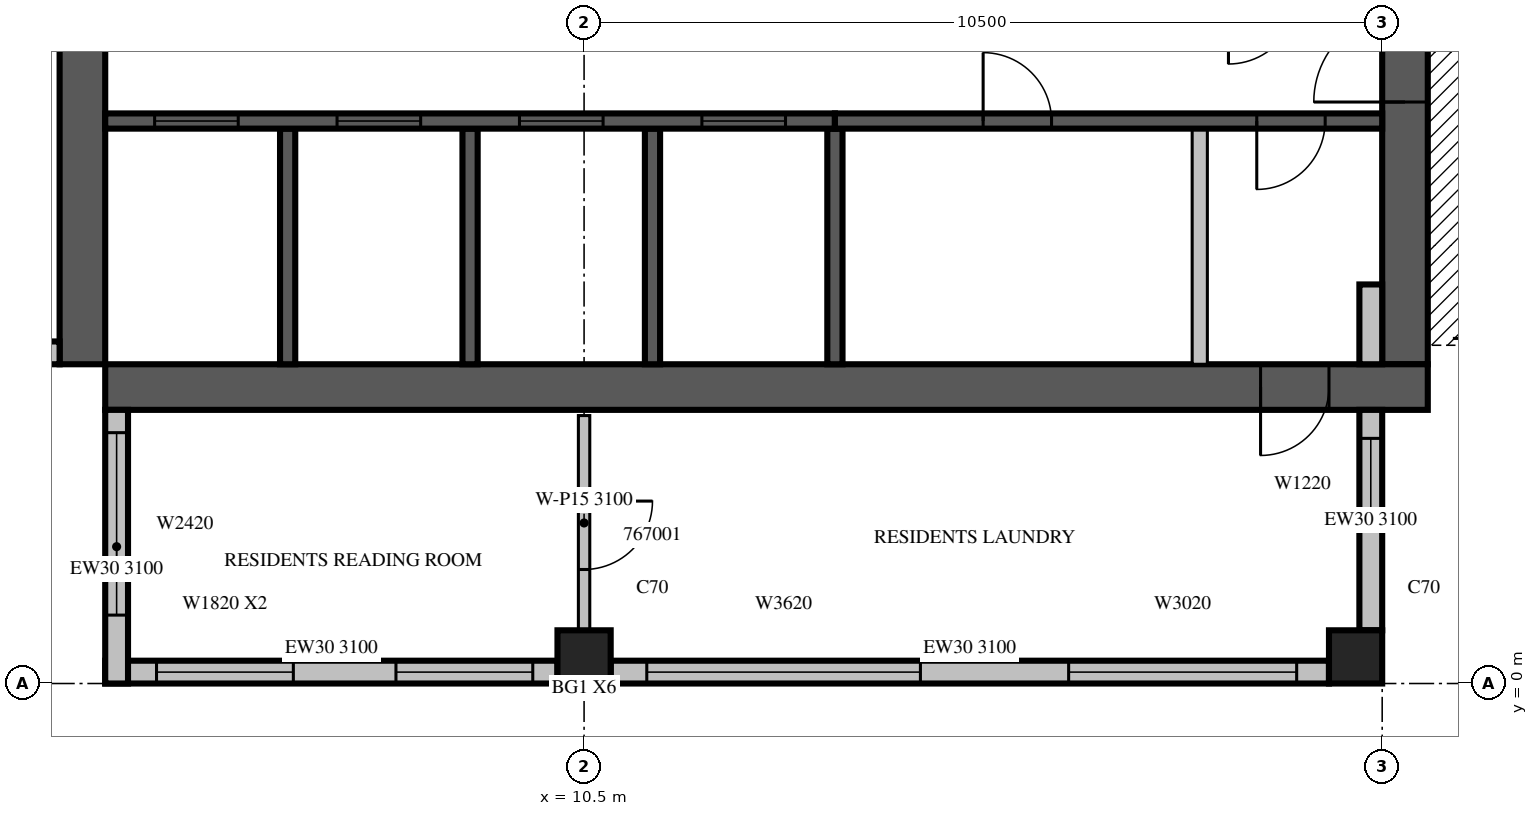
"""IFC4 building model, lengths in metres.
Left out: names, types, materials, properties, quantities, classifications, styles, units other than length and angle.
Written with IfcOpenShell. Run it as: python <this file> out.ifc"""

import sys

from ifc_helpers import new_model, si_unit, direction, frame, frame_2d, origin, origin_2d, place, context, subcontext, project, spatial, rectangle, extrude, source, transform, mapped, element, fill, save


model = new_model("IFC4")
c1 = context("Model", 3, precision=1e-05, world=origin(), true_north=direction((0.0, 1.0)))
c2 = subcontext(c1, "Body", "Model", "MODEL_VIEW")
j1 = project(units=[si_unit("LENGTHUNIT", "METRE"), si_unit("PLANEANGLEUNIT", "RADIAN")], contexts=[c1])
p1 = place(None, origin())
s1 = spatial("IfcSite", under=j1, at=p1, CompositionType="ELEMENT")
p2 = place(p1, origin())
s2 = spatial("IfcBuilding", under=s1, at=p2, CompositionType="ELEMENT")
p3 = place(p2, frame((0.0, 0.0, 295.0)))
s3 = spatial("IfcBuildingStorey", under=s2, at=p3, CompositionType="ELEMENT", Elevation=295.0)
m1 = source(origin(), c2, "Body", "SweptSolid", [
    extrude(rectangle(XDim=0.7, YDim=0.7, at=origin_2d()), origin(), (0.0, 0.0, 1.0), 3.5),
])
for number, where, z_axis, x_axis in (
    (1, (10.5, 0.35, 0.0), (0.0, 0.0, 1.0), (1.0, 0.0, 0.0)),
    (2, (20.65, 0.35, 0.0), (0.0, 0.0, 1.0), (1.0, 0.0, 0.0)),
):
    element("IfcColumn", number, at=place(p3, frame(where, z_axis=z_axis, x_axis=x_axis)), inside=s3, PredefinedType="COLUMN", context=c2, shape_type="MappedRepresentation", body=[
        mapped(m1, transform((0.0, 0.0, 0.0), scale=1.0)),
    ])
m2 = source(origin(), c2, "Body", "SweptSolid", [
    extrude(rectangle(XDim=17.4, YDim=0.6, at=frame_2d((8.7, 0.0))), origin(), (0.0, 0.0, 1.0), 3.5),
])
p4 = place(p3, frame((3.9, 4.2, 0.0), z_axis=(0.0, 0.0, 1.0), x_axis=(0.0, 1.0, 0.0)))
e3 = element("IfcWall", 3, at=p4, inside=s3, PredefinedType="SHEAR", context=c2, shape_type="MappedRepresentation", body=[
    mapped(m2, transform((0.0, 0.0, 0.0), scale=1.0)),
])
m3 = source(origin(), c2, "Body", "SweptSolid", [
    extrude(rectangle(XDim=2.2, YDim=2.1, at=frame_2d((1.1, 1.05))), frame((0.0, 0.31, 0.0), z_axis=(0.0, -1.0, 0.0), x_axis=(1.0, 0.0, 0.0)), (0.0, 0.0, 1.0), 0.62),
])
p5 = place(p4, frame((4.2, 0.0, 0.0)))
e4 = element("IfcOpeningElement", 4, at=p5, cuts=e3, PredefinedType="OPENING", context=c2, shape_type="MappedRepresentation", body=[
    mapped(m3, transform((0.0, 0.0, 0.0), scale=1.0)),
])
m4 = source(origin(), c2, "Body", "SweptSolid", [
    extrude(rectangle(XDim=0.9, YDim=2.1, at=frame_2d((0.45, 1.05))), frame((0.0, 0.31, 0.0), z_axis=(0.0, -1.0, 0.0), x_axis=(1.0, 0.0, 0.0)), (0.0, 0.0, 1.0), 0.62),
])
p6 = place(p4, frame((10.95, 0.0, 0.0)))
e5 = element("IfcOpeningElement", 5, at=p6, cuts=e3, PredefinedType="OPENING", context=c2, shape_type="MappedRepresentation", body=[
    mapped(m4, transform((0.0, 0.0, 0.0), scale=1.0)),
])
m5 = source(origin(), c2, "Body", "SweptSolid", [
    extrude(rectangle(XDim=6.3, YDim=0.6, at=frame_2d((3.15, 0.0))), origin(), (0.0, 0.0, 1.0), 3.5),
])
p7 = place(p3, frame((21.3, 4.2, 0.0), z_axis=(0.0, 0.0, 1.0), x_axis=(0.0, 1.0, 0.0)))
e6 = element("IfcWall", 6, at=p7, inside=s3, PredefinedType="SHEAR", context=c2, shape_type="MappedRepresentation", body=[
    mapped(m5, transform((0.0, 0.0, 0.0), scale=1.0)),
])
m6 = source(origin(), c2, "Body", "SweptSolid", [
    extrude(rectangle(XDim=1.2, YDim=2.1, at=frame_2d((0.6, 1.05))), frame((0.0, 0.31, 0.0), z_axis=(0.0, -1.0, 0.0), x_axis=(1.0, 0.0, 0.0)), (0.0, 0.0, 1.0), 0.62),
])
p8 = place(p7, frame((3.45, 0.0, 0.0)))
e7 = element("IfcOpeningElement", 7, at=p8, cuts=e6, PredefinedType="OPENING", context=c2, shape_type="MappedRepresentation", body=[
    mapped(m6, transform((0.0, 0.0, 0.0), scale=1.0)),
])
p9 = place(p3, frame((4.2, 3.9, 0.0), z_axis=(0.0, 0.0, 1.0), x_axis=(1.0, 0.0, 0.0)))
e8 = element("IfcWall", 8, at=p9, inside=s3, PredefinedType="SHEAR", context=c2, shape_type="MappedRepresentation", body=[
    mapped(m2, transform((0.0, 0.0, 0.0), scale=1.0)),
])
p10 = place(p9, frame((15.2, 0.0, 0.0)))
e9 = element("IfcOpeningElement", 9, at=p10, cuts=e8, PredefinedType="OPENING", context=c2, shape_type="MappedRepresentation", body=[
    mapped(m4, transform((0.0, 0.0, 0.0), scale=1.0)),
])
m7 = source(origin(), c2, "Body", "SweptSolid", [
    extrude(rectangle(XDim=5.95, YDim=0.3, at=frame_2d((2.975, 0.0))), origin(), (0.0, 0.0, 1.0), 3.1),
])
p11 = place(p3, frame((4.2, 0.15, 0.0), z_axis=(0.0, 0.0, 1.0), x_axis=(1.0, 0.0, 0.0)))
e10 = element("IfcWall", 10, at=p11, inside=s3, PredefinedType="STANDARD", context=c2, shape_type="MappedRepresentation", body=[
    mapped(m7, transform((0.0, 0.0, 0.0), scale=1.0)),
])
m8 = source(origin(), c2, "Body", "SweptSolid", [
    extrude(rectangle(XDim=1.8, YDim=2.0, at=frame_2d((0.9, 1.0))), frame((0.0, 0.16, 0.0), z_axis=(0.0, -1.0, 0.0), x_axis=(1.0, 0.0, 0.0)), (0.0, 0.0, 1.0), 0.32),
])
p12 = place(p11, frame((0.675, 0.0, 0.6)))
e11 = element("IfcOpeningElement", 11, at=p12, cuts=e10, PredefinedType="OPENING", context=c2, shape_type="MappedRepresentation", body=[
    mapped(m8, transform((0.0, 0.0, 0.0), scale=1.0)),
])
p13 = place(p11, frame((3.825, 0.0, 0.6)))
e12 = element("IfcOpeningElement", 12, at=p13, cuts=e10, PredefinedType="OPENING", context=c2, shape_type="MappedRepresentation", body=[
    mapped(m8, transform((0.0, 0.0, 0.0), scale=1.0)),
])
m9 = source(origin(), c2, "Body", "SweptSolid", [
    extrude(rectangle(XDim=9.45, YDim=0.3, at=frame_2d((4.725, 0.0))), origin(), (0.0, 0.0, 1.0), 3.1),
])
p14 = place(p3, frame((10.85, 0.15, 0.0), z_axis=(0.0, 0.0, 1.0), x_axis=(1.0, 0.0, 0.0)))
e13 = element("IfcWall", 13, at=p14, inside=s3, PredefinedType="STANDARD", context=c2, shape_type="MappedRepresentation", body=[
    mapped(m9, transform((0.0, 0.0, 0.0), scale=1.0)),
])
m10 = source(origin(), c2, "Body", "SweptSolid", [
    extrude(rectangle(XDim=3.6, YDim=2.0, at=frame_2d((1.8, 1.0))), frame((0.0, 0.16, 0.0), z_axis=(0.0, -1.0, 0.0), x_axis=(1.0, 0.0, 0.0)), (0.0, 0.0, 1.0), 0.32),
])
p15 = place(p14, frame((0.475, 0.0, 0.6)))
e14 = element("IfcOpeningElement", 14, at=p15, cuts=e13, PredefinedType="OPENING", context=c2, shape_type="MappedRepresentation", body=[
    mapped(m10, transform((0.0, 0.0, 0.0), scale=1.0)),
])
m11 = source(origin(), c2, "Body", "SweptSolid", [
    extrude(rectangle(XDim=3.0, YDim=2.0, at=frame_2d((1.5, 1.0))), frame((0.0, 0.16, 0.0), z_axis=(0.0, -1.0, 0.0), x_axis=(1.0, 0.0, 0.0)), (0.0, 0.0, 1.0), 0.32),
])
p16 = place(p14, frame((6.025, 0.0, 0.6)))
e15 = element("IfcOpeningElement", 15, at=p16, cuts=e13, PredefinedType="OPENING", context=c2, shape_type="MappedRepresentation", body=[
    mapped(m11, transform((0.0, 0.0, 0.0), scale=1.0)),
])
m12 = source(origin(), c2, "Body", "SweptSolid", [
    extrude(rectangle(XDim=2.9, YDim=0.3, at=frame_2d((1.45, 0.0))), origin(), (0.0, 0.0, 1.0), 3.1),
])
p17 = place(p3, frame((20.85, 0.7, 0.0), z_axis=(0.0, 0.0, 1.0), x_axis=(0.0, 1.0, 0.0)))
e16 = element("IfcWall", 16, at=p17, inside=s3, PredefinedType="STANDARD", context=c2, shape_type="MappedRepresentation", body=[
    mapped(m12, transform((0.0, 0.0, 0.0), scale=1.0)),
])
m13 = source(origin(), c2, "Body", "SweptSolid", [
    extrude(rectangle(XDim=1.2, YDim=2.0, at=frame_2d((0.6, 1.0))), frame((0.0, 0.16, 0.0), z_axis=(0.0, -1.0, 0.0), x_axis=(1.0, 0.0, 0.0)), (0.0, 0.0, 1.0), 0.32),
])
p18 = place(p17, frame((1.325, 0.0, 0.6)))
e17 = element("IfcOpeningElement", 17, at=p18, cuts=e16, PredefinedType="OPENING", context=c2, shape_type="MappedRepresentation", body=[
    mapped(m13, transform((0.0, 0.0, 0.0), scale=1.0)),
])
m14 = source(origin(), c2, "Body", "SweptSolid", [
    extrude(rectangle(XDim=1.05, YDim=0.3, at=frame_2d((0.525, 0.0))), origin(), (0.0, 0.0, 1.0), 3.1),
])
p19 = place(p3, frame((20.85, 4.2, 0.0), z_axis=(0.0, 0.0, 1.0), x_axis=(0.0, 1.0, 0.0)))
e18 = element("IfcWall", 18, at=p19, inside=s3, PredefinedType="STANDARD", context=c2, shape_type="MappedRepresentation", body=[
    mapped(m14, transform((0.0, 0.0, 0.0), scale=1.0)),
])
m15 = source(origin(), c2, "Body", "SweptSolid", [
    extrude(rectangle(XDim=3.6, YDim=0.3, at=frame_2d((1.8, 0.0))), origin(), (0.0, 0.0, 1.0), 3.1),
])
p20 = place(p3, frame((0.0, 4.35, 0.0), z_axis=(0.0, 0.0, 1.0), x_axis=(1.0, 0.0, 0.0)))
e19 = element("IfcWall", 19, at=p20, inside=s3, PredefinedType="STANDARD", context=c2, shape_type="MappedRepresentation", body=[
    mapped(m15, transform((0.0, 0.0, 0.0), scale=1.0)),
])
m16 = source(origin(), c2, "Body", "SweptSolid", [
    extrude(rectangle(XDim=2.4, YDim=2.0, at=frame_2d((1.2, 1.0))), frame((0.0, 0.16, 0.0), z_axis=(0.0, -1.0, 0.0), x_axis=(1.0, 0.0, 0.0)), (0.0, 0.0, 1.0), 0.32),
])
p21 = place(p20, frame((0.9, 0.0, 0.6)))
e20 = element("IfcOpeningElement", 20, at=p21, cuts=e19, PredefinedType="OPENING", context=c2, shape_type="MappedRepresentation", body=[
    mapped(m16, transform((0.0, 0.0, 0.0), scale=1.0)),
])
p22 = place(p3, frame((4.35, 3.6, 0.0), z_axis=(0.0, 0.0, 1.0), x_axis=(0.0, -1.0, 0.0)))
e21 = element("IfcWall", 21, at=p22, inside=s3, PredefinedType="STANDARD", context=c2, shape_type="MappedRepresentation", body=[
    mapped(m15, transform((0.0, 0.0, 0.0), scale=1.0)),
])
p23 = place(p22, frame((0.3, 0.0, 0.6)))
e22 = element("IfcOpeningElement", 22, at=p23, cuts=e21, PredefinedType="OPENING", context=c2, shape_type="MappedRepresentation", body=[
    mapped(m16, transform((0.0, 0.0, 0.0), scale=1.0)),
])
m17 = source(origin(), c2, "Body", "SweptSolid", [
    extrude(rectangle(XDim=3.1, YDim=0.2, at=frame_2d((1.55, 0.0))), origin(), (0.0, 0.0, 1.0), 3.5),
])
for number, where, z_axis, x_axis in (
    (23, (6.6, 4.2, 0.0), (0.0, 0.0, 1.0), (0.0, 1.0, 0.0)),
    (24, (9.0, 4.2, 0.0), (0.0, 0.0, 1.0), (0.0, 1.0, 0.0)),
    (25, (11.4, 4.2, 0.0), (0.0, 0.0, 1.0), (0.0, 1.0, 0.0)),
):
    element("IfcWall", number, at=place(p3, frame(where, z_axis=z_axis, x_axis=x_axis)), inside=s3, PredefinedType="SOLIDWALL", context=c2, shape_type="MappedRepresentation", body=[
        mapped(m17, transform((0.0, 0.0, 0.0), scale=1.0)),
    ])
m18 = source(origin(), c2, "Body", "SweptSolid", [
    extrude(rectangle(XDim=3.1, YDim=0.2, at=frame_2d((1.55, 0.0))), origin(), (0.0, 0.0, 1.0), 3.1),
])
p24 = place(p3, frame((13.8, 4.2, 0.0), z_axis=(0.0, 0.0, 1.0), x_axis=(0.0, 1.0, 0.0)))
e26 = element("IfcWall", 26, at=p24, inside=s3, PredefinedType="SOLIDWALL", context=c2, shape_type="MappedRepresentation", body=[
    mapped(m18, transform((0.0, 0.0, 0.0), scale=1.0)),
])
m19 = source(origin(), c2, "Body", "SweptSolid", [
    extrude(rectangle(XDim=3.1, YDim=0.2, at=frame_2d((1.55, 0.0))), origin(), (0.0, 0.0, 1.0), 3.1),
])
p25 = place(p3, frame((18.6, 4.2, 0.0), z_axis=(0.0, 0.0, 1.0), x_axis=(0.0, 1.0, 0.0)))
e27 = element("IfcWall", 27, at=p25, inside=s3, PredefinedType="PARTITIONING", context=c2, shape_type="MappedRepresentation", body=[
    mapped(m19, transform((0.0, 0.0, 0.0), scale=1.0)),
])
m20 = source(origin(), c2, "Body", "SweptSolid", [
    extrude(rectangle(XDim=9.6, YDim=0.2, at=frame_2d((4.8, 0.0))), origin(), (0.0, 0.0, 1.0), 3.5),
])
p26 = place(p3, frame((4.2, 7.4, 0.0), z_axis=(0.0, 0.0, 1.0), x_axis=(1.0, 0.0, 0.0)))
e28 = element("IfcWall", 28, at=p26, inside=s3, PredefinedType="SOLIDWALL", context=c2, shape_type="MappedRepresentation", body=[
    mapped(m20, transform((0.0, 0.0, 0.0), scale=1.0)),
])
m21 = source(origin(), c2, "Body", "SweptSolid", [
    extrude(rectangle(XDim=1.1, YDim=2.1, at=frame_2d((0.55, 1.05))), frame((0.0, 0.11, 0.0), z_axis=(0.0, -1.0, 0.0), x_axis=(1.0, 0.0, 0.0)), (0.0, 0.0, 1.0), 0.22),
])
p27 = place(p26, frame((0.65, 0.0, 0.0)))
e29 = element("IfcOpeningElement", 29, at=p27, cuts=e28, PredefinedType="OPENING", context=c2, shape_type="MappedRepresentation", body=[
    mapped(m21, transform((0.0, 0.0, 0.0), scale=1.0)),
])
p28 = place(p26, frame((3.05, 0.0, 0.0)))
e30 = element("IfcOpeningElement", 30, at=p28, cuts=e28, PredefinedType="OPENING", context=c2, shape_type="MappedRepresentation", body=[
    mapped(m21, transform((0.0, 0.0, 0.0), scale=1.0)),
])
p29 = place(p26, frame((5.45, 0.0, 0.0)))
e31 = element("IfcOpeningElement", 31, at=p29, cuts=e28, PredefinedType="OPENING", context=c2, shape_type="MappedRepresentation", body=[
    mapped(m21, transform((0.0, 0.0, 0.0), scale=1.0)),
])
p30 = place(p26, frame((7.85, 0.0, 0.0)))
e32 = element("IfcOpeningElement", 32, at=p30, cuts=e28, PredefinedType="OPENING", context=c2, shape_type="MappedRepresentation", body=[
    mapped(m21, transform((0.0, 0.0, 0.0), scale=1.0)),
])
m22 = source(origin(), c2, "Body", "SweptSolid", [
    extrude(rectangle(XDim=7.2, YDim=0.2, at=frame_2d((3.6, 0.0))), origin(), (0.0, 0.0, 1.0), 3.1),
])
p31 = place(p3, frame((13.8, 7.4, 0.0), z_axis=(0.0, 0.0, 1.0), x_axis=(1.0, 0.0, 0.0)))
e33 = element("IfcWall", 33, at=p31, inside=s3, PredefinedType="SOLIDWALL", context=c2, shape_type="MappedRepresentation", body=[
    mapped(m22, transform((0.0, 0.0, 0.0), scale=1.0)),
])
m23 = source(origin(), c2, "Body", "SweptSolid", [
    extrude(rectangle(XDim=0.9, YDim=2.1, at=frame_2d((0.45, 1.05))), frame((0.0, 0.11, 0.0), z_axis=(0.0, -1.0, 0.0), x_axis=(1.0, 0.0, 0.0)), (0.0, 0.0, 1.0), 0.22),
])
p32 = place(p31, frame((1.95, 0.0, 0.0)))
e34 = element("IfcOpeningElement", 34, at=p32, cuts=e33, PredefinedType="OPENING", context=c2, shape_type="MappedRepresentation", body=[
    mapped(m23, transform((0.0, 0.0, 0.0), scale=1.0)),
])
p33 = place(p31, frame((5.55, 0.0, 0.0)))
e35 = element("IfcOpeningElement", 35, at=p33, cuts=e33, PredefinedType="OPENING", context=c2, shape_type="MappedRepresentation", body=[
    mapped(m23, transform((0.0, 0.0, 0.0), scale=1.0)),
])
p34 = place(p3, frame((10.5, 3.525, 0.0), z_axis=(0.0, 0.0, 1.0), x_axis=(0.0, -1.0, 0.0)))
e36 = element("IfcWall", 36, at=p34, inside=s3, PredefinedType="PARTITIONING", context=c2, shape_type="SweptSolid", body=[
    extrude(rectangle(XDim=2.826, YDim=0.15, at=frame_2d((1.413, 0.0))), origin(), (0.0, 0.0, 1.0), 3.1),
])
m24 = source(origin(), c2, "Body", "SweptSolid", [
    extrude(rectangle(XDim=0.9, YDim=2.1, at=frame_2d((0.45, 1.05))), frame((0.0, 0.085, 0.0), z_axis=(0.0, -1.0, 0.0), x_axis=(1.0, 0.0, 0.0)), (0.0, 0.0, 1.0), 0.17),
])
p35 = place(p34, frame((1.125, 0.0, 0.0)))
e37 = element("IfcOpeningElement", 37, at=p35, cuts=e36, PredefinedType="OPENING", context=c2, shape_type="MappedRepresentation", body=[
    mapped(m24, transform((0.0, 0.0, 0.0), scale=1.0)),
])
m25 = source(origin(), c2, "Body", "SweptSolid", [
    extrude(rectangle(XDim=1.8, YDim=2.0, at=frame_2d((0.9, 1.0))), frame((0.0, 0.03, 0.0), z_axis=(0.0, -1.0, 0.0), x_axis=(1.0, 0.0, 0.0)), (0.0, 0.0, 1.0), 0.06),
])
p36 = place(p12, origin())
e38 = element("IfcWindow", 38, at=p36, inside=s3, PartitioningType="SINGLE_PANEL", PredefinedType="WINDOW", context=c2, shape_type="MappedRepresentation", body=[
    mapped(m25, transform((0.0, 0.0, 0.0), scale=1.0)),
])
fill(e11, e38)
p37 = place(p13, origin())
e39 = element("IfcWindow", 39, at=p37, inside=s3, PartitioningType="SINGLE_PANEL", PredefinedType="WINDOW", context=c2, shape_type="MappedRepresentation", body=[
    mapped(m25, transform((0.0, 0.0, 0.0), scale=1.0)),
])
fill(e12, e39)
m26 = source(origin(), c2, "Body", "SweptSolid", [
    extrude(rectangle(XDim=3.6, YDim=2.0, at=frame_2d((1.8, 1.0))), frame((0.0, 0.03, 0.0), z_axis=(0.0, -1.0, 0.0), x_axis=(1.0, 0.0, 0.0)), (0.0, 0.0, 1.0), 0.06),
])
p38 = place(p15, origin())
e40 = element("IfcWindow", 40, at=p38, inside=s3, PartitioningType="SINGLE_PANEL", PredefinedType="WINDOW", context=c2, shape_type="MappedRepresentation", body=[
    mapped(m26, transform((0.0, 0.0, 0.0), scale=1.0)),
])
fill(e14, e40)
m27 = source(origin(), c2, "Body", "SweptSolid", [
    extrude(rectangle(XDim=3.0, YDim=2.0, at=frame_2d((1.5, 1.0))), frame((0.0, 0.03, 0.0), z_axis=(0.0, -1.0, 0.0), x_axis=(1.0, 0.0, 0.0)), (0.0, 0.0, 1.0), 0.06),
])
p39 = place(p16, origin())
e41 = element("IfcWindow", 41, at=p39, inside=s3, PartitioningType="SINGLE_PANEL", PredefinedType="WINDOW", context=c2, shape_type="MappedRepresentation", body=[
    mapped(m27, transform((0.0, 0.0, 0.0), scale=1.0)),
])
fill(e15, e41)
m28 = source(origin(), c2, "Body", "SweptSolid", [
    extrude(rectangle(XDim=1.2, YDim=2.0, at=frame_2d((0.6, 1.0))), frame((0.0, 0.03, 0.0), z_axis=(0.0, -1.0, 0.0), x_axis=(1.0, 0.0, 0.0)), (0.0, 0.0, 1.0), 0.06),
])
p40 = place(p18, origin())
e42 = element("IfcWindow", 42, at=p40, inside=s3, PartitioningType="SINGLE_PANEL", PredefinedType="WINDOW", context=c2, shape_type="MappedRepresentation", body=[
    mapped(m28, transform((0.0, 0.0, 0.0), scale=1.0)),
])
fill(e17, e42)
m29 = source(origin(), c2, "Body", "SweptSolid", [
    extrude(rectangle(XDim=2.4, YDim=2.0, at=frame_2d((1.2, 1.0))), frame((0.0, 0.03, 0.0), z_axis=(0.0, -1.0, 0.0), x_axis=(1.0, 0.0, 0.0)), (0.0, 0.0, 1.0), 0.06),
])
p41 = place(p23, origin())
e43 = element("IfcWindow", 43, at=p41, inside=s3, PartitioningType="SINGLE_PANEL", PredefinedType="WINDOW", context=c2, shape_type="MappedRepresentation", body=[
    mapped(m29, transform((0.0, 0.0, 0.0), scale=1.0)),
])
fill(e22, e43)
m30 = source(origin(), c2, "Body", "SweptSolid", [
    extrude(rectangle(XDim=1.1, YDim=2.1, at=frame_2d((0.55, 1.05))), frame((0.0, 0.025, 0.0), z_axis=(0.0, -1.0, 0.0), x_axis=(1.0, 0.0, 0.0)), (0.0, 0.0, 1.0), 0.05),
])
p42 = place(p27, origin())
e44 = element("IfcDoor", 44, at=p42, inside=s3, OperationType="SLIDING_TO_LEFT", PredefinedType="DOOR", context=c2, shape_type="MappedRepresentation", body=[
    mapped(m30, transform((0.0, 0.0, 0.0), scale=1.0)),
])
fill(e29, e44)
p43 = place(p28, origin())
e45 = element("IfcDoor", 45, at=p43, inside=s3, OperationType="SLIDING_TO_LEFT", PredefinedType="DOOR", context=c2, shape_type="MappedRepresentation", body=[
    mapped(m30, transform((0.0, 0.0, 0.0), scale=1.0)),
])
fill(e30, e45)
p44 = place(p29, origin())
e46 = element("IfcDoor", 46, at=p44, inside=s3, OperationType="SLIDING_TO_LEFT", PredefinedType="DOOR", context=c2, shape_type="MappedRepresentation", body=[
    mapped(m30, transform((0.0, 0.0, 0.0), scale=1.0)),
])
fill(e31, e46)
p45 = place(p30, origin())
e47 = element("IfcDoor", 47, at=p45, inside=s3, OperationType="SLIDING_TO_LEFT", PredefinedType="DOOR", context=c2, shape_type="MappedRepresentation", body=[
    mapped(m30, transform((0.0, 0.0, 0.0), scale=1.0)),
])
fill(e32, e47)
m31 = source(origin(), c2, "Body", "SweptSolid", [
    extrude(rectangle(XDim=0.9, YDim=2.1, at=frame_2d((0.45, 1.05))), frame((0.0, 0.025, 0.0), z_axis=(0.0, -1.0, 0.0), x_axis=(1.0, 0.0, 0.0)), (0.0, 0.0, 1.0), 0.05),
])
p46 = place(p32, origin())
e48 = element("IfcDoor", 48, at=p46, inside=s3, OperationType="SINGLE_SWING_LEFT", PredefinedType="DOOR", context=c2, shape_type="MappedRepresentation", body=[
    mapped(m31, transform((0.0, 0.0, 0.0), scale=1.0)),
])
fill(e34, e48)
p47 = place(p33, origin())
e49 = element("IfcDoor", 49, at=p47, inside=s3, OperationType="SINGLE_SWING_RIGHT", PredefinedType="DOOR", context=c2, shape_type="MappedRepresentation", body=[
    mapped(m31, transform((0.0, 0.0, 0.0), scale=1.0)),
])
fill(e35, e49)
m32 = source(origin(), c2, "Body", "SweptSolid", [
    extrude(rectangle(XDim=1.2, YDim=2.1, at=frame_2d((0.6, 1.05))), frame((0.0, 0.025, 0.0), z_axis=(0.0, -1.0, 0.0), x_axis=(1.0, 0.0, 0.0)), (0.0, 0.0, 1.0), 0.05),
])
p48 = place(p8, origin())
e50 = element("IfcDoor", 50, at=p48, inside=s3, OperationType="SINGLE_SWING_LEFT", PredefinedType="DOOR", context=c2, shape_type="MappedRepresentation", body=[
    mapped(m32, transform((0.0, 0.0, 0.0), scale=1.0)),
])
fill(e7, e50)
p49 = place(p10, origin())
e51 = element("IfcDoor", 51, at=p49, inside=s3, OperationType="SINGLE_SWING_RIGHT", PredefinedType="DOOR", context=c2, shape_type="MappedRepresentation", body=[
    mapped(m31, transform((0.0, 0.0, 0.0), scale=1.0)),
])
fill(e9, e51)
p50 = place(p35, origin())
e52 = element("IfcDoor", 52, at=p50, inside=s3, OperationType="SINGLE_SWING_LEFT", PredefinedType="DOOR", context=c2, shape_type="MappedRepresentation", body=[
    mapped(m31, transform((0.0, 0.0, 0.0), scale=1.0)),
])
fill(e37, e52)
save(model, sys.argv[1])
